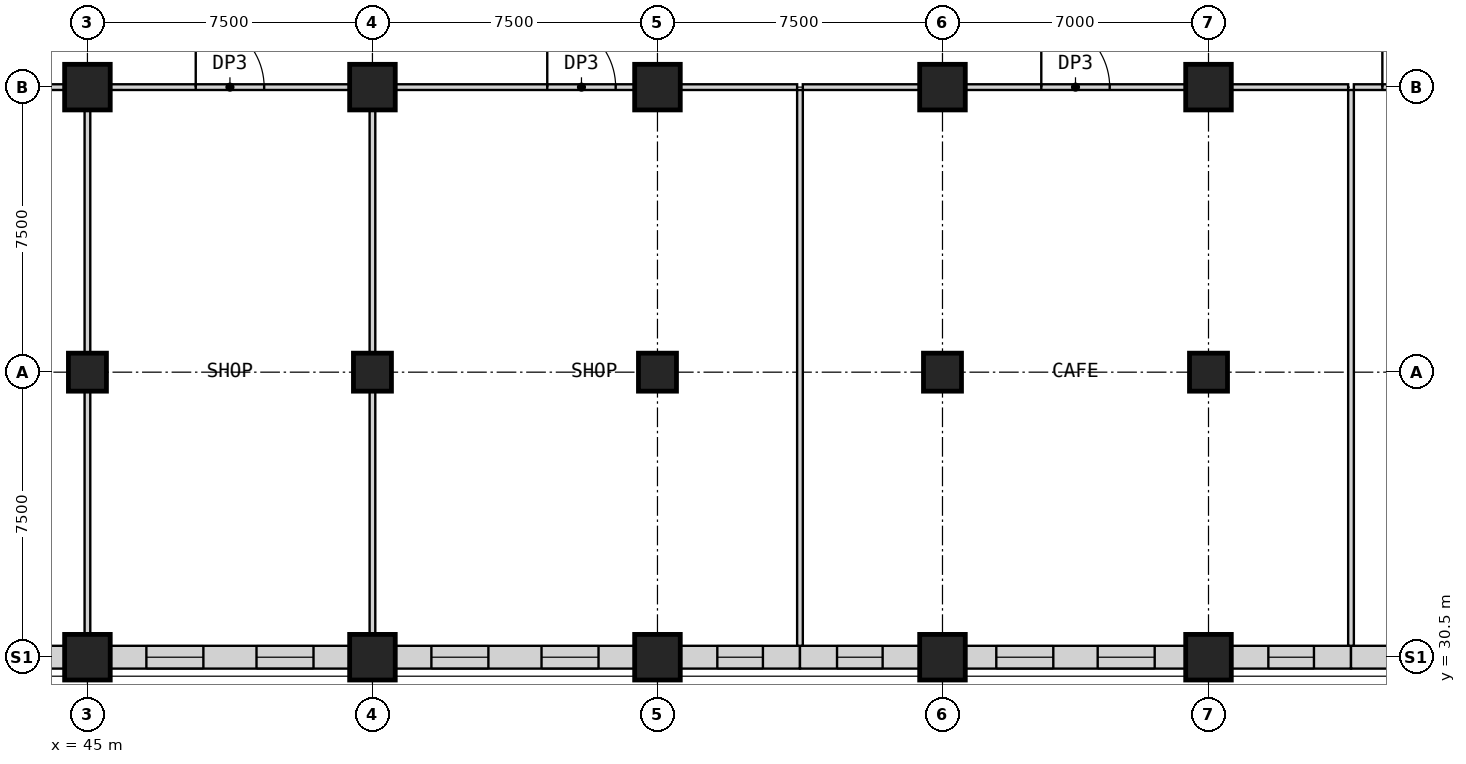
"""IFC4 building model, lengths in metres.
Left out: names, types, materials, properties, quantities, classifications, styles, units other than length and angle.
Written with IfcOpenShell. Run it as: python <this file> out.ifc"""

import sys

from ifc_helpers import new_model, si_unit, direction, frame, frame_2d, origin, origin_2d, place, context, subcontext, project, spatial, rectangle, extrude, element, fill, save


model = new_model("IFC4")
c1 = context("Model", 3, precision=1e-05, world=origin(), true_north=direction((0.0, 1.0)))
c2 = subcontext(c1, "Body", "Model", "MODEL_VIEW")
j1 = project(units=[si_unit("LENGTHUNIT", "METRE"), si_unit("PLANEANGLEUNIT", "RADIAN")], contexts=[c1])
p1 = place(None, origin())
s1 = spatial("IfcSite", under=j1, at=p1, CompositionType="ELEMENT")
p2 = place(p1, origin())
s2 = spatial("IfcBuilding", under=s1, at=p2, CompositionType="ELEMENT")
p3 = place(p2, frame((0.0, 0.0, 8.0)))
s3 = spatial("IfcBuildingStorey", under=s2, at=p3, CompositionType="ELEMENT", Elevation=8.0)
p4 = place(p3, frame((45.0, 38.0, 0.0), z_axis=(0.0, 0.0, 1.0), x_axis=(1.0, 0.0, 0.0)))
e1 = element("IfcColumn", 1, at=p4, inside=s3, PredefinedType="COLUMN", context=c2, shape_type="SweptSolid", body=[
    extrude(rectangle(XDim=1.0, YDim=1.0, at=origin_2d()), origin(), (0.0, 0.0, 1.0), 5.5),
])
p5 = place(p3, frame((45.0, 45.5, 0.0), z_axis=(0.0, 0.0, 1.0), x_axis=(1.0, 0.0, 0.0)))
e2 = element("IfcColumn", 2, at=p5, inside=s3, PredefinedType="COLUMN", context=c2, shape_type="SweptSolid", body=[
    extrude(rectangle(XDim=1.2, YDim=1.2, at=origin_2d()), origin(), (0.0, 0.0, 1.0), 5.5),
])
p6 = place(p3, frame((52.5, 38.0, 0.0), z_axis=(0.0, 0.0, 1.0), x_axis=(1.0, 0.0, 0.0)))
e3 = element("IfcColumn", 3, at=p6, inside=s3, PredefinedType="COLUMN", context=c2, shape_type="SweptSolid", body=[
    extrude(rectangle(XDim=1.0, YDim=1.0, at=origin_2d()), origin(), (0.0, 0.0, 1.0), 5.5),
])
p7 = place(p3, frame((52.5, 45.5, 0.0), z_axis=(0.0, 0.0, 1.0), x_axis=(1.0, 0.0, 0.0)))
e4 = element("IfcColumn", 4, at=p7, inside=s3, PredefinedType="COLUMN", context=c2, shape_type="SweptSolid", body=[
    extrude(rectangle(XDim=1.2, YDim=1.2, at=origin_2d()), origin(), (0.0, 0.0, 1.0), 5.5),
])
p8 = place(p3, frame((60.0, 38.0, 0.0), z_axis=(0.0, 0.0, 1.0), x_axis=(1.0, 0.0, 0.0)))
e5 = element("IfcColumn", 5, at=p8, inside=s3, PredefinedType="COLUMN", context=c2, shape_type="SweptSolid", body=[
    extrude(rectangle(XDim=1.0, YDim=1.0, at=origin_2d()), origin(), (0.0, 0.0, 1.0), 5.5),
])
p9 = place(p3, frame((60.0, 45.5, 0.0), z_axis=(0.0, 0.0, 1.0), x_axis=(1.0, 0.0, 0.0)))
e6 = element("IfcColumn", 6, at=p9, inside=s3, PredefinedType="COLUMN", context=c2, shape_type="SweptSolid", body=[
    extrude(rectangle(XDim=1.2, YDim=1.2, at=origin_2d()), origin(), (0.0, 0.0, 1.0), 5.5),
])
p10 = place(p3, frame((67.5, 38.0, 0.0), z_axis=(0.0, 0.0, 1.0), x_axis=(1.0, 0.0, 0.0)))
e7 = element("IfcColumn", 7, at=p10, inside=s3, PredefinedType="COLUMN", context=c2, shape_type="SweptSolid", body=[
    extrude(rectangle(XDim=1.0, YDim=1.0, at=origin_2d()), origin(), (0.0, 0.0, 1.0), 5.5),
])
p11 = place(p3, frame((67.5, 45.5, 0.0), z_axis=(0.0, 0.0, 1.0), x_axis=(1.0, 0.0, 0.0)))
e8 = element("IfcColumn", 8, at=p11, inside=s3, PredefinedType="COLUMN", context=c2, shape_type="SweptSolid", body=[
    extrude(rectangle(XDim=1.2, YDim=1.2, at=origin_2d()), origin(), (0.0, 0.0, 1.0), 5.5),
])
p12 = place(p3, frame((74.5, 38.0, 0.0), z_axis=(0.0, 0.0, 1.0), x_axis=(1.0, 0.0, 0.0)))
e9 = element("IfcColumn", 9, at=p12, inside=s3, PredefinedType="COLUMN", context=c2, shape_type="SweptSolid", body=[
    extrude(rectangle(XDim=1.0, YDim=1.0, at=origin_2d()), origin(), (0.0, 0.0, 1.0), 5.5),
])
for number, where, z_axis, x_axis in (
    (10, (74.5, 45.5, 0.0), (0.0, 0.0, 1.0), (1.0, 0.0, 0.0)),
    (11, (45.0, 30.5, 0.0), (0.0, 0.0, 1.0), (1.0, 0.0, 0.0)),
    (12, (52.5, 30.5, 0.0), (0.0, 0.0, 1.0), (1.0, 0.0, 0.0)),
    (13, (60.0, 30.5, 0.0), (0.0, 0.0, 1.0), (1.0, 0.0, 0.0)),
    (14, (67.5, 30.5, 0.0), (0.0, 0.0, 1.0), (1.0, 0.0, 0.0)),
    (15, (74.5, 30.5, 0.0), (0.0, 0.0, 1.0), (1.0, 0.0, 0.0)),
):
    element("IfcColumn", number, at=place(p3, frame(where, z_axis=z_axis, x_axis=x_axis)), inside=s3, PredefinedType="COLUMN", context=c2, shape_type="SweptSolid", body=[
        extrude(rectangle(XDim=1.2, YDim=1.2, at=origin_2d()), origin(), (0.0, 0.0, 1.0), 5.5),
    ])
p13 = place(p3, frame((38.1, 30.5, 0.0), z_axis=(0.0, 0.0, 1.0), x_axis=(1.0, 0.0, 0.0)))
e16 = element("IfcWall", 16, at=p13, inside=s3, PredefinedType="PARTITIONING", context=c2, shape_type="SweptSolid", body=[
    extrude(rectangle(XDim=6.3, YDim=0.6, at=frame_2d((3.15, 0.0))), origin(), (0.0, 0.0, 1.0), 4.6),
])
p14 = place(p13, frame((0.951, 0.0, 0.9)))
e17 = element("IfcOpeningElement", 17, at=p14, cuts=e16, PredefinedType="OPENING", context=c2, shape_type="SweptSolid", body=[
    extrude(rectangle(XDim=1.5, YDim=2.8, at=frame_2d((0.75, 1.4))), frame((0.0, 0.31, 0.0), z_axis=(0.0, -1.0, 0.0), x_axis=(1.0, 0.0, 0.0)), (0.0, 0.0, 1.0), 0.62),
])
p15 = place(p13, frame((3.849, 0.0, 0.9)))
e18 = element("IfcOpeningElement", 18, at=p15, cuts=e16, PredefinedType="OPENING", context=c2, shape_type="SweptSolid", body=[
    extrude(rectangle(XDim=1.5, YDim=2.8, at=frame_2d((0.75, 1.4))), frame((0.0, 0.31, 0.0), z_axis=(0.0, -1.0, 0.0), x_axis=(1.0, 0.0, 0.0)), (0.0, 0.0, 1.0), 0.62),
])
p16 = place(p3, frame((45.6, 30.5, 0.0), z_axis=(0.0, 0.0, 1.0), x_axis=(1.0, 0.0, 0.0)))
e19 = element("IfcWall", 19, at=p16, inside=s3, PredefinedType="PARTITIONING", context=c2, shape_type="SweptSolid", body=[
    extrude(rectangle(XDim=6.3, YDim=0.6, at=frame_2d((3.15, 0.0))), origin(), (0.0, 0.0, 1.0), 4.6),
])
p17 = place(p16, frame((0.951, 0.0, 0.9)))
e20 = element("IfcOpeningElement", 20, at=p17, cuts=e19, PredefinedType="OPENING", context=c2, shape_type="SweptSolid", body=[
    extrude(rectangle(XDim=1.5, YDim=2.8, at=frame_2d((0.75, 1.4))), frame((0.0, 0.31, 0.0), z_axis=(0.0, -1.0, 0.0), x_axis=(1.0, 0.0, 0.0)), (0.0, 0.0, 1.0), 0.62),
])
p18 = place(p16, frame((3.849, 0.0, 0.9)))
e21 = element("IfcOpeningElement", 21, at=p18, cuts=e19, PredefinedType="OPENING", context=c2, shape_type="SweptSolid", body=[
    extrude(rectangle(XDim=1.5, YDim=2.8, at=frame_2d((0.75, 1.4))), frame((0.0, 0.31, 0.0), z_axis=(0.0, -1.0, 0.0), x_axis=(1.0, 0.0, 0.0)), (0.0, 0.0, 1.0), 0.62),
])
p19 = place(p3, frame((53.1, 30.5, 0.0), z_axis=(0.0, 0.0, 1.0), x_axis=(1.0, 0.0, 0.0)))
e22 = element("IfcWall", 22, at=p19, inside=s3, PredefinedType="PARTITIONING", context=c2, shape_type="SweptSolid", body=[
    extrude(rectangle(XDim=6.3, YDim=0.6, at=frame_2d((3.15, 0.0))), origin(), (0.0, 0.0, 1.0), 4.6),
])
p20 = place(p19, frame((0.951, 0.0, 0.9)))
e23 = element("IfcOpeningElement", 23, at=p20, cuts=e22, PredefinedType="OPENING", context=c2, shape_type="SweptSolid", body=[
    extrude(rectangle(XDim=1.5, YDim=2.8, at=frame_2d((0.75, 1.4))), frame((0.0, 0.31, 0.0), z_axis=(0.0, -1.0, 0.0), x_axis=(1.0, 0.0, 0.0)), (0.0, 0.0, 1.0), 0.62),
])
p21 = place(p19, frame((3.849, 0.0, 0.9)))
e24 = element("IfcOpeningElement", 24, at=p21, cuts=e22, PredefinedType="OPENING", context=c2, shape_type="SweptSolid", body=[
    extrude(rectangle(XDim=1.5, YDim=2.8, at=frame_2d((0.75, 1.4))), frame((0.0, 0.31, 0.0), z_axis=(0.0, -1.0, 0.0), x_axis=(1.0, 0.0, 0.0)), (0.0, 0.0, 1.0), 0.62),
])
p22 = place(p3, frame((60.6, 30.5, 0.0), z_axis=(0.0, 0.0, 1.0), x_axis=(1.0, 0.0, 0.0)))
e25 = element("IfcWall", 25, at=p22, inside=s3, PredefinedType="PARTITIONING", context=c2, shape_type="SweptSolid", body=[
    extrude(rectangle(XDim=3.15, YDim=0.6, at=frame_2d((1.575, 0.0))), origin(), (0.0, 0.0, 1.0), 4.6),
])
p23 = place(p22, frame((0.975, 0.0, 0.9)))
e26 = element("IfcOpeningElement", 26, at=p23, cuts=e25, PredefinedType="OPENING", context=c2, shape_type="SweptSolid", body=[
    extrude(rectangle(XDim=1.2, YDim=2.8, at=frame_2d((0.6, 1.4))), frame((0.0, 0.31, 0.0), z_axis=(0.0, -1.0, 0.0), x_axis=(1.0, 0.0, 0.0)), (0.0, 0.0, 1.0), 0.62),
])
p24 = place(p3, frame((63.75, 30.5, 0.0), z_axis=(0.0, 0.0, 1.0), x_axis=(1.0, 0.0, 0.0)))
e27 = element("IfcWall", 27, at=p24, inside=s3, PredefinedType="PARTITIONING", context=c2, shape_type="SweptSolid", body=[
    extrude(rectangle(XDim=3.15, YDim=0.6, at=frame_2d((1.575, 0.0))), origin(), (0.0, 0.0, 1.0), 4.6),
])
p25 = place(p24, frame((0.975, 0.0, 0.9)))
e28 = element("IfcOpeningElement", 28, at=p25, cuts=e27, PredefinedType="OPENING", context=c2, shape_type="SweptSolid", body=[
    extrude(rectangle(XDim=1.2, YDim=2.8, at=frame_2d((0.6, 1.4))), frame((0.0, 0.31, 0.0), z_axis=(0.0, -1.0, 0.0), x_axis=(1.0, 0.0, 0.0)), (0.0, 0.0, 1.0), 0.62),
])
p26 = place(p3, frame((68.1, 30.5, 0.0), z_axis=(0.0, 0.0, 1.0), x_axis=(1.0, 0.0, 0.0)))
e29 = element("IfcWall", 29, at=p26, inside=s3, PredefinedType="PARTITIONING", context=c2, shape_type="SweptSolid", body=[
    extrude(rectangle(XDim=5.8, YDim=0.6, at=frame_2d((2.9, 0.0))), origin(), (0.0, 0.0, 1.0), 4.6),
])
p27 = place(p26, frame((0.816, 0.0, 0.9)))
e30 = element("IfcOpeningElement", 30, at=p27, cuts=e29, PredefinedType="OPENING", context=c2, shape_type="SweptSolid", body=[
    extrude(rectangle(XDim=1.5, YDim=2.8, at=frame_2d((0.75, 1.4))), frame((0.0, 0.31, 0.0), z_axis=(0.0, -1.0, 0.0), x_axis=(1.0, 0.0, 0.0)), (0.0, 0.0, 1.0), 0.62),
])
p28 = place(p26, frame((3.484, 0.0, 0.9)))
e31 = element("IfcOpeningElement", 31, at=p28, cuts=e29, PredefinedType="OPENING", context=c2, shape_type="SweptSolid", body=[
    extrude(rectangle(XDim=1.5, YDim=2.8, at=frame_2d((0.75, 1.4))), frame((0.0, 0.31, 0.0), z_axis=(0.0, -1.0, 0.0), x_axis=(1.0, 0.0, 0.0)), (0.0, 0.0, 1.0), 0.62),
])
p29 = place(p3, frame((75.1, 30.5, 0.0), z_axis=(0.0, 0.0, 1.0), x_axis=(1.0, 0.0, 0.0)))
e32 = element("IfcWall", 32, at=p29, inside=s3, PredefinedType="PARTITIONING", context=c2, shape_type="SweptSolid", body=[
    extrude(rectangle(XDim=3.15, YDim=0.6, at=frame_2d((1.575, 0.0))), origin(), (0.0, 0.0, 1.0), 4.6),
])
p30 = place(p29, frame((0.975, 0.0, 0.9)))
e33 = element("IfcOpeningElement", 33, at=p30, cuts=e32, PredefinedType="OPENING", context=c2, shape_type="SweptSolid", body=[
    extrude(rectangle(XDim=1.2, YDim=2.8, at=frame_2d((0.6, 1.4))), frame((0.0, 0.31, 0.0), z_axis=(0.0, -1.0, 0.0), x_axis=(1.0, 0.0, 0.0)), (0.0, 0.0, 1.0), 0.62),
])
p31 = place(p3, frame((78.25, 30.5, 0.0), z_axis=(0.0, 0.0, 1.0), x_axis=(1.0, 0.0, 0.0)))
e34 = element("IfcWall", 34, at=p31, inside=s3, PredefinedType="PARTITIONING", context=c2, shape_type="SweptSolid", body=[
    extrude(rectangle(XDim=3.15, YDim=0.6, at=frame_2d((1.575, 0.0))), origin(), (0.0, 0.0, 1.0), 4.6),
])
p32 = place(p31, frame((0.975, 0.0, 0.9)))
e35 = element("IfcOpeningElement", 35, at=p32, cuts=e34, PredefinedType="OPENING", context=c2, shape_type="SweptSolid", body=[
    extrude(rectangle(XDim=1.2, YDim=2.8, at=frame_2d((0.6, 1.4))), frame((0.0, 0.31, 0.0), z_axis=(0.0, -1.0, 0.0), x_axis=(1.0, 0.0, 0.0)), (0.0, 0.0, 1.0), 0.62),
])
p33 = place(p3, frame((38.1, 45.5, 0.0), z_axis=(0.0, 0.0, 1.0), x_axis=(1.0, 0.0, 0.0)))
e36 = element("IfcWall", 36, at=p33, inside=s3, PredefinedType="PARTITIONING", context=c2, shape_type="SweptSolid", body=[
    extrude(rectangle(XDim=6.3, YDim=0.15, at=frame_2d((3.15, 0.0))), origin(), (0.0, 0.0, 1.0), 5.2),
])
p34 = place(p33, frame((0.5, 0.0, 0.0)))
e37 = element("IfcOpeningElement", 37, at=p34, cuts=e36, PredefinedType="OPENING", context=c2, shape_type="SweptSolid", body=[
    extrude(rectangle(XDim=1.8, YDim=2.4, at=frame_2d((0.9, 1.2))), frame((0.0, 0.085, 0.0), z_axis=(0.0, -1.0, 0.0), x_axis=(1.0, 0.0, 0.0)), (0.0, 0.0, 1.0), 0.17),
])
p35 = place(p3, frame((45.6, 45.5, 0.0), z_axis=(0.0, 0.0, 1.0), x_axis=(1.0, 0.0, 0.0)))
e38 = element("IfcWall", 38, at=p35, inside=s3, PredefinedType="PARTITIONING", context=c2, shape_type="SweptSolid", body=[
    extrude(rectangle(XDim=6.3, YDim=0.15, at=frame_2d((3.15, 0.0))), origin(), (0.0, 0.0, 1.0), 5.2),
])
p36 = place(p35, frame((2.25, 0.0, 0.0)))
e39 = element("IfcOpeningElement", 39, at=p36, cuts=e38, PredefinedType="OPENING", context=c2, shape_type="SweptSolid", body=[
    extrude(rectangle(XDim=1.8, YDim=2.4, at=frame_2d((0.9, 1.2))), frame((0.0, 0.085, 0.0), z_axis=(0.0, -1.0, 0.0), x_axis=(1.0, 0.0, 0.0)), (0.0, 0.0, 1.0), 0.17),
])
p37 = place(p3, frame((53.1, 45.5, 0.0), z_axis=(0.0, 0.0, 1.0), x_axis=(1.0, 0.0, 0.0)))
e40 = element("IfcWall", 40, at=p37, inside=s3, PredefinedType="PARTITIONING", context=c2, shape_type="SweptSolid", body=[
    extrude(rectangle(XDim=6.3, YDim=0.15, at=frame_2d((3.15, 0.0))), origin(), (0.0, 0.0, 1.0), 5.2),
])
p38 = place(p37, frame((4.0, 0.0, 0.0)))
e41 = element("IfcOpeningElement", 41, at=p38, cuts=e40, PredefinedType="OPENING", context=c2, shape_type="SweptSolid", body=[
    extrude(rectangle(XDim=1.8, YDim=2.4, at=frame_2d((0.9, 1.2))), frame((0.0, 0.085, 0.0), z_axis=(0.0, -1.0, 0.0), x_axis=(1.0, 0.0, 0.0)), (0.0, 0.0, 1.0), 0.17),
])
for number, where, z_axis, x_axis in (
    (42, (60.6, 45.5, 0.0), (0.0, 0.0, 1.0), (1.0, 0.0, 0.0)),
    (43, (63.825, 45.5, 0.0), (0.0, 0.0, 1.0), (1.0, 0.0, 0.0)),
):
    element("IfcWall", number, at=place(p3, frame(where, z_axis=z_axis, x_axis=x_axis)), inside=s3, PredefinedType="PARTITIONING", context=c2, shape_type="SweptSolid", body=[
        extrude(rectangle(XDim=3.075, YDim=0.15, at=frame_2d((1.538, 0.0))), origin(), (0.0, 0.0, 1.0), 5.2),
    ])
p39 = place(p3, frame((68.1, 45.5, 0.0), z_axis=(0.0, 0.0, 1.0), x_axis=(1.0, 0.0, 0.0)))
e44 = element("IfcWall", 44, at=p39, inside=s3, PredefinedType="PARTITIONING", context=c2, shape_type="SweptSolid", body=[
    extrude(rectangle(XDim=5.8, YDim=0.15, at=frame_2d((2.9, 0.0))), origin(), (0.0, 0.0, 1.0), 5.2),
])
p40 = place(p39, frame((2.0, 0.0, 0.0)))
e45 = element("IfcOpeningElement", 45, at=p40, cuts=e44, PredefinedType="OPENING", context=c2, shape_type="SweptSolid", body=[
    extrude(rectangle(XDim=1.8, YDim=2.4, at=frame_2d((0.9, 1.2))), frame((0.0, 0.085, 0.0), z_axis=(0.0, -1.0, 0.0), x_axis=(1.0, 0.0, 0.0)), (0.0, 0.0, 1.0), 0.17),
])
p41 = place(p3, frame((75.1, 45.5, 0.0), z_axis=(0.0, 0.0, 1.0), x_axis=(1.0, 0.0, 0.0)))
e46 = element("IfcWall", 46, at=p41, inside=s3, PredefinedType="PARTITIONING", context=c2, shape_type="SweptSolid", body=[
    extrude(rectangle(XDim=3.075, YDim=0.15, at=frame_2d((1.538, 0.0))), origin(), (0.0, 0.0, 1.0), 5.2),
])
p42 = place(p3, frame((78.325, 45.5, 0.0), z_axis=(0.0, 0.0, 1.0), x_axis=(1.0, 0.0, 0.0)))
e47 = element("IfcWall", 47, at=p42, inside=s3, PredefinedType="PARTITIONING", context=c2, shape_type="SweptSolid", body=[
    extrude(rectangle(XDim=3.075, YDim=0.15, at=frame_2d((1.538, 0.0))), origin(), (0.0, 0.0, 1.0), 5.2),
])
p43 = place(p42, frame((0.75, 0.0, 0.0)))
e48 = element("IfcOpeningElement", 48, at=p43, cuts=e47, PredefinedType="OPENING", context=c2, shape_type="SweptSolid", body=[
    extrude(rectangle(XDim=1.8, YDim=2.4, at=frame_2d((0.9, 1.2))), frame((0.0, 0.085, 0.0), z_axis=(0.0, -1.0, 0.0), x_axis=(1.0, 0.0, 0.0)), (0.0, 0.0, 1.0), 0.17),
])
for number, where, z_axis, x_axis in (
    (49, (45.0, 31.1, 0.0), (0.0, 0.0, 1.0), (0.0, 1.0, 0.0)),
    (50, (45.0, 38.5, 0.0), (0.0, 0.0, 1.0), (0.0, 1.0, 0.0)),
    (51, (52.5, 31.1, 0.0), (0.0, 0.0, 1.0), (0.0, 1.0, 0.0)),
    (52, (52.5, 38.5, 0.0), (0.0, 0.0, 1.0), (0.0, 1.0, 0.0)),
):
    element("IfcWall", number, at=place(p3, frame(where, z_axis=z_axis, x_axis=x_axis)), inside=s3, PredefinedType="PARTITIONING", context=c2, shape_type="SweptSolid", body=[
        extrude(rectangle(XDim=6.4, YDim=0.15, at=frame_2d((3.2, 0.0))), origin(), (0.0, 0.0, 1.0), 5.2),
    ])
for number, where, z_axis, x_axis in (
    (53, (63.75, 30.8, 0.0), (0.0, 0.0, 1.0), (0.0, 1.0, 0.0)),
    (54, (78.25, 30.8, 0.0), (0.0, 0.0, 1.0), (0.0, 1.0, 0.0)),
):
    element("IfcWall", number, at=place(p3, frame(where, z_axis=z_axis, x_axis=x_axis)), inside=s3, PredefinedType="PARTITIONING", context=c2, shape_type="SweptSolid", body=[
        extrude(rectangle(XDim=14.625, YDim=0.15, at=frame_2d((7.312, 0.0))), origin(), (0.0, 0.0, 1.0), 5.2),
    ])
p44 = place(p17, origin())
e55 = element("IfcWindow", 55, at=p44, inside=s3, PartitioningType="SINGLE_PANEL", PredefinedType="WINDOW", context=c2, shape_type="SweptSolid", body=[
    extrude(rectangle(XDim=1.5, YDim=2.8, at=frame_2d((0.75, 1.4))), frame((0.0, 0.03, 0.0), z_axis=(0.0, -1.0, 0.0), x_axis=(1.0, 0.0, 0.0)), (0.0, 0.0, 1.0), 0.06),
])
fill(e20, e55)
p45 = place(p18, origin())
e56 = element("IfcWindow", 56, at=p45, inside=s3, PartitioningType="SINGLE_PANEL", PredefinedType="WINDOW", context=c2, shape_type="SweptSolid", body=[
    extrude(rectangle(XDim=1.5, YDim=2.8, at=frame_2d((0.75, 1.4))), frame((0.0, 0.03, 0.0), z_axis=(0.0, -1.0, 0.0), x_axis=(1.0, 0.0, 0.0)), (0.0, 0.0, 1.0), 0.06),
])
fill(e21, e56)
p46 = place(p20, origin())
e57 = element("IfcWindow", 57, at=p46, inside=s3, PartitioningType="SINGLE_PANEL", PredefinedType="WINDOW", context=c2, shape_type="SweptSolid", body=[
    extrude(rectangle(XDim=1.5, YDim=2.8, at=frame_2d((0.75, 1.4))), frame((0.0, 0.03, 0.0), z_axis=(0.0, -1.0, 0.0), x_axis=(1.0, 0.0, 0.0)), (0.0, 0.0, 1.0), 0.06),
])
fill(e23, e57)
p47 = place(p21, origin())
e58 = element("IfcWindow", 58, at=p47, inside=s3, PartitioningType="SINGLE_PANEL", PredefinedType="WINDOW", context=c2, shape_type="SweptSolid", body=[
    extrude(rectangle(XDim=1.5, YDim=2.8, at=frame_2d((0.75, 1.4))), frame((0.0, 0.03, 0.0), z_axis=(0.0, -1.0, 0.0), x_axis=(1.0, 0.0, 0.0)), (0.0, 0.0, 1.0), 0.06),
])
fill(e24, e58)
p48 = place(p23, origin())
e59 = element("IfcWindow", 59, at=p48, inside=s3, PartitioningType="SINGLE_PANEL", PredefinedType="WINDOW", context=c2, shape_type="SweptSolid", body=[
    extrude(rectangle(XDim=1.2, YDim=2.8, at=frame_2d((0.6, 1.4))), frame((0.0, 0.03, 0.0), z_axis=(0.0, -1.0, 0.0), x_axis=(1.0, 0.0, 0.0)), (0.0, 0.0, 1.0), 0.06),
])
fill(e26, e59)
p49 = place(p25, origin())
e60 = element("IfcWindow", 60, at=p49, inside=s3, PartitioningType="SINGLE_PANEL", PredefinedType="WINDOW", context=c2, shape_type="SweptSolid", body=[
    extrude(rectangle(XDim=1.2, YDim=2.8, at=frame_2d((0.6, 1.4))), frame((0.0, 0.03, 0.0), z_axis=(0.0, -1.0, 0.0), x_axis=(1.0, 0.0, 0.0)), (0.0, 0.0, 1.0), 0.06),
])
fill(e28, e60)
p50 = place(p27, origin())
e61 = element("IfcWindow", 61, at=p50, inside=s3, PartitioningType="SINGLE_PANEL", PredefinedType="WINDOW", context=c2, shape_type="SweptSolid", body=[
    extrude(rectangle(XDim=1.5, YDim=2.8, at=frame_2d((0.75, 1.4))), frame((0.0, 0.03, 0.0), z_axis=(0.0, -1.0, 0.0), x_axis=(1.0, 0.0, 0.0)), (0.0, 0.0, 1.0), 0.06),
])
fill(e30, e61)
p51 = place(p28, origin())
e62 = element("IfcWindow", 62, at=p51, inside=s3, PartitioningType="SINGLE_PANEL", PredefinedType="WINDOW", context=c2, shape_type="SweptSolid", body=[
    extrude(rectangle(XDim=1.5, YDim=2.8, at=frame_2d((0.75, 1.4))), frame((0.0, 0.03, 0.0), z_axis=(0.0, -1.0, 0.0), x_axis=(1.0, 0.0, 0.0)), (0.0, 0.0, 1.0), 0.06),
])
fill(e31, e62)
p52 = place(p30, origin())
e63 = element("IfcWindow", 63, at=p52, inside=s3, PartitioningType="SINGLE_PANEL", PredefinedType="WINDOW", context=c2, shape_type="SweptSolid", body=[
    extrude(rectangle(XDim=1.2, YDim=2.8, at=frame_2d((0.6, 1.4))), frame((0.0, 0.03, 0.0), z_axis=(0.0, -1.0, 0.0), x_axis=(1.0, 0.0, 0.0)), (0.0, 0.0, 1.0), 0.06),
])
fill(e33, e63)
p53 = place(p36, origin())
e64 = element("IfcDoor", 64, at=p53, inside=s3, OperationType="SINGLE_SWING_LEFT", PredefinedType="DOOR", context=c2, shape_type="SweptSolid", body=[
    extrude(rectangle(XDim=1.8, YDim=2.4, at=frame_2d((0.9, 1.2))), frame((0.0, 0.025, 0.0), z_axis=(0.0, -1.0, 0.0), x_axis=(1.0, 0.0, 0.0)), (0.0, 0.0, 1.0), 0.05),
])
fill(e39, e64)
p54 = place(p38, origin())
e65 = element("IfcDoor", 65, at=p54, inside=s3, OperationType="SINGLE_SWING_LEFT", PredefinedType="DOOR", context=c2, shape_type="SweptSolid", body=[
    extrude(rectangle(XDim=1.8, YDim=2.4, at=frame_2d((0.9, 1.2))), frame((0.0, 0.025, 0.0), z_axis=(0.0, -1.0, 0.0), x_axis=(1.0, 0.0, 0.0)), (0.0, 0.0, 1.0), 0.05),
])
fill(e41, e65)
p55 = place(p40, origin())
e66 = element("IfcDoor", 66, at=p55, inside=s3, OperationType="SINGLE_SWING_LEFT", PredefinedType="DOOR", context=c2, shape_type="SweptSolid", body=[
    extrude(rectangle(XDim=1.8, YDim=2.4, at=frame_2d((0.9, 1.2))), frame((0.0, 0.025, 0.0), z_axis=(0.0, -1.0, 0.0), x_axis=(1.0, 0.0, 0.0)), (0.0, 0.0, 1.0), 0.05),
])
fill(e45, e66)
p56 = place(p43, origin())
e67 = element("IfcDoor", 67, at=p56, inside=s3, OperationType="SINGLE_SWING_LEFT", PredefinedType="DOOR", context=c2, shape_type="SweptSolid", body=[
    extrude(rectangle(XDim=1.8, YDim=2.4, at=frame_2d((0.9, 1.2))), frame((0.0, 0.025, 0.0), z_axis=(0.0, -1.0, 0.0), x_axis=(1.0, 0.0, 0.0)), (0.0, 0.0, 1.0), 0.05),
])
fill(e48, e67)
save(model, sys.argv[1])
